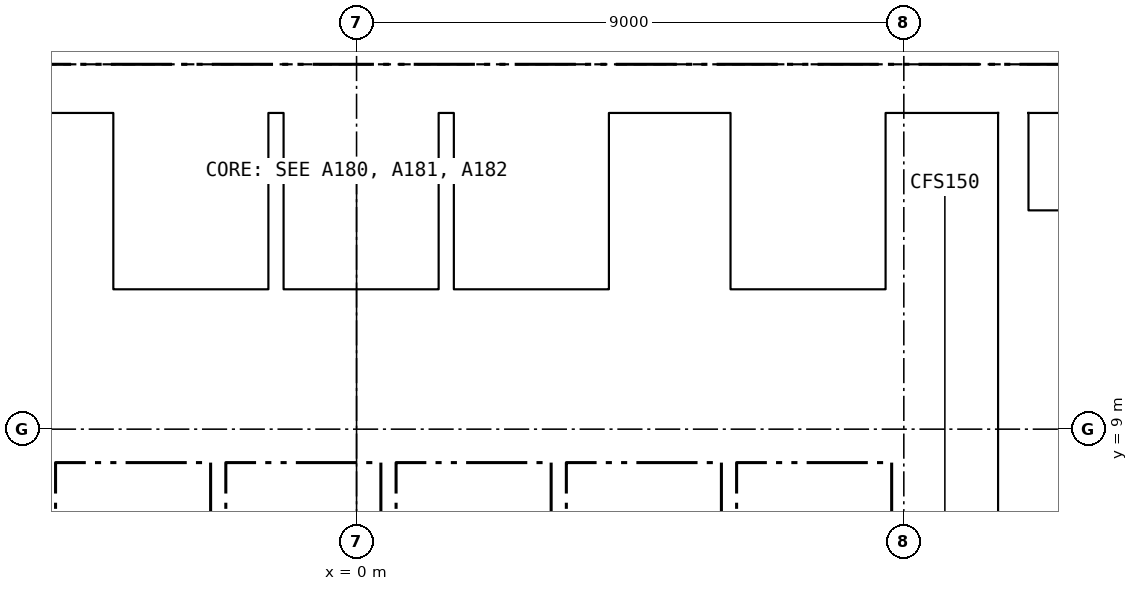
"""IFC4 building model, lengths in metres.
Left out: names, types, materials, properties, quantities, classifications, styles, units other than length and angle.
Written with IfcOpenShell. Run it as: python <this file> out.ifc"""

import sys

from ifc_helpers import new_model, si_unit, direction, frame, frame_2d, origin, place, context, subcontext, project, spatial, rectangle, extrude, element, fill, save


model = new_model("IFC4")
c1 = context("Model", 3, precision=1e-05, world=origin(), true_north=direction((0.0, 1.0)))
c2 = subcontext(c1, "Body", "Model", "MODEL_VIEW")
j1 = project(units=[si_unit("LENGTHUNIT", "METRE"), si_unit("PLANEANGLEUNIT", "RADIAN")], contexts=[c1])
p1 = place(None, origin())
s1 = spatial("IfcSite", under=j1, at=p1, CompositionType="ELEMENT")
p2 = place(p1, origin())
s2 = spatial("IfcBuilding", under=s1, at=p2, CompositionType="ELEMENT")
p3 = place(p2, frame((0.0, 0.0, 148.05)))
s3 = spatial("IfcBuildingStorey", under=s2, at=p3, CompositionType="ELEMENT", Elevation=148.05)
p4 = place(p3, frame((-15.0, 14.6, -0.15), z_axis=(0.0, 0.0, 1.0), x_axis=(1.0, 0.0, 0.0)))
e1 = element("IfcWall", 1, at=p4, inside=s3, PredefinedType="SOLIDWALL", context=c2, shape_type="SweptSolid", body=[
    extrude(rectangle(XDim=30.0, YDim=0.8, at=frame_2d((15.0, 0.0))), origin(), (0.0, 0.0, 1.0), 3.65),
])
p5 = place(p4, frame((9.25, 0.0, 0.15)))
e2 = element("IfcOpeningElement", 2, at=p5, cuts=e1, PredefinedType="OPENING", context=c2, shape_type="SweptSolid", body=[
    extrude(rectangle(XDim=1.5, YDim=2.1, at=frame_2d((0.75, 1.05))), frame((0.0, 0.41, 0.0), z_axis=(0.0, -1.0, 0.0), x_axis=(1.0, 0.0, 0.0)), (0.0, 0.0, 1.0), 0.82),
])
p6 = place(p4, frame((19.4, 0.0, 0.15)))
e3 = element("IfcOpeningElement", 3, at=p6, cuts=e1, PredefinedType="OPENING", context=c2, shape_type="SweptSolid", body=[
    extrude(rectangle(XDim=1.5, YDim=2.1, at=frame_2d((0.75, 1.05))), frame((0.0, 0.41, 0.0), z_axis=(0.0, -1.0, 0.0), x_axis=(1.0, 0.0, 0.0)), (0.0, 0.0, 1.0), 0.82),
])
p7 = place(p4, frame((1.5, 0.0, 0.15)))
e4 = element("IfcOpeningElement", 4, at=p7, cuts=e1, PredefinedType="OPENING", context=c2, shape_type="SweptSolid", body=[
    extrude(rectangle(XDim=1.2, YDim=2.1, at=frame_2d((0.6, 1.05))), frame((0.0, 0.41, 0.0), z_axis=(0.0, -1.0, 0.0), x_axis=(1.0, 0.0, 0.0)), (0.0, 0.0, 1.0), 0.82),
])
p8 = place(p4, frame((27.3, 0.0, 0.15)))
e5 = element("IfcOpeningElement", 5, at=p8, cuts=e1, PredefinedType="OPENING", context=c2, shape_type="SweptSolid", body=[
    extrude(rectangle(XDim=1.2, YDim=2.1, at=frame_2d((0.6, 1.05))), frame((0.0, 0.41, 0.0), z_axis=(0.0, -1.0, 0.0), x_axis=(1.0, 0.0, 0.0)), (0.0, 0.0, 1.0), 0.82),
])
p9 = place(p3, frame((10.8, 0.8, -0.15), z_axis=(0.0, 0.0, 1.0), x_axis=(0.0, 1.0, 0.0)))
e6 = element("IfcWall", 6, at=p9, inside=s3, PredefinedType="SOLIDWALL", context=c2, shape_type="SweptSolid", body=[
    extrude(rectangle(XDim=13.4, YDim=0.5, at=frame_2d((6.7, 0.0))), origin(), (0.0, 0.0, 1.0), 3.65),
])
p10 = place(p3, frame((-10.55, 8.55, 0.0), z_axis=(0.0, 0.0, 1.0), x_axis=(1.0, 0.0, 0.0)))
e7 = element("IfcWall", 7, at=p10, inside=s3, PredefinedType="PARTITIONING", context=c2, shape_type="SweptSolid", body=[
    extrude(rectangle(XDim=21.1, YDim=0.2, at=frame_2d((10.55, 0.0))), origin(), (0.0, 0.0, 1.0), 3.5),
])
p11 = place(p10, frame((0.675, 0.0, 0.0)))
e8 = element("IfcOpeningElement", 8, at=p11, cuts=e7, PredefinedType="OPENING", context=c2, shape_type="SweptSolid", body=[
    extrude(rectangle(XDim=1.2, YDim=2.1, at=frame_2d((0.6, 1.05))), frame((0.0, 0.11, 0.0), z_axis=(0.0, -1.0, 0.0), x_axis=(1.0, 0.0, 0.0)), (0.0, 0.0, 1.0), 0.22),
])
p12 = place(p10, frame((3.475, 0.0, 0.0)))
e9 = element("IfcOpeningElement", 9, at=p12, cuts=e7, PredefinedType="OPENING", context=c2, shape_type="SweptSolid", body=[
    extrude(rectangle(XDim=1.2, YDim=2.1, at=frame_2d((0.6, 1.05))), frame((0.0, 0.11, 0.0), z_axis=(0.0, -1.0, 0.0), x_axis=(1.0, 0.0, 0.0)), (0.0, 0.0, 1.0), 0.22),
])
p13 = place(p10, frame((6.275, 0.0, 0.0)))
e10 = element("IfcOpeningElement", 10, at=p13, cuts=e7, PredefinedType="OPENING", context=c2, shape_type="SweptSolid", body=[
    extrude(rectangle(XDim=1.2, YDim=2.1, at=frame_2d((0.6, 1.05))), frame((0.0, 0.11, 0.0), z_axis=(0.0, -1.0, 0.0), x_axis=(1.0, 0.0, 0.0)), (0.0, 0.0, 1.0), 0.22),
])
p14 = place(p10, frame((9.075, 0.0, 0.0)))
e11 = element("IfcOpeningElement", 11, at=p14, cuts=e7, PredefinedType="OPENING", context=c2, shape_type="SweptSolid", body=[
    extrude(rectangle(XDim=1.2, YDim=2.1, at=frame_2d((0.6, 1.05))), frame((0.0, 0.11, 0.0), z_axis=(0.0, -1.0, 0.0), x_axis=(1.0, 0.0, 0.0)), (0.0, 0.0, 1.0), 0.22),
])
p15 = place(p10, frame((11.875, 0.0, 0.0)))
e12 = element("IfcOpeningElement", 12, at=p15, cuts=e7, PredefinedType="OPENING", context=c2, shape_type="SweptSolid", body=[
    extrude(rectangle(XDim=1.2, YDim=2.1, at=frame_2d((0.6, 1.05))), frame((0.0, 0.11, 0.0), z_axis=(0.0, -1.0, 0.0), x_axis=(1.0, 0.0, 0.0)), (0.0, 0.0, 1.0), 0.22),
])
p16 = place(p10, frame((14.675, 0.0, 0.0)))
e13 = element("IfcOpeningElement", 13, at=p16, cuts=e7, PredefinedType="OPENING", context=c2, shape_type="SweptSolid", body=[
    extrude(rectangle(XDim=1.2, YDim=2.1, at=frame_2d((0.6, 1.05))), frame((0.0, 0.11, 0.0), z_axis=(0.0, -1.0, 0.0), x_axis=(1.0, 0.0, 0.0)), (0.0, 0.0, 1.0), 0.22),
])
p17 = place(p10, frame((17.475, 0.0, 0.0)))
e14 = element("IfcOpeningElement", 14, at=p17, cuts=e7, PredefinedType="OPENING", context=c2, shape_type="SweptSolid", body=[
    extrude(rectangle(XDim=1.2, YDim=2.1, at=frame_2d((0.6, 1.05))), frame((0.0, 0.11, 0.0), z_axis=(0.0, -1.0, 0.0), x_axis=(1.0, 0.0, 0.0)), (0.0, 0.0, 1.0), 0.22),
])
p18 = place(p10, frame((19.9, 0.0, 0.0)))
e15 = element("IfcOpeningElement", 15, at=p18, cuts=e7, PredefinedType="OPENING", context=c2, shape_type="SweptSolid", body=[
    extrude(rectangle(XDim=0.9, YDim=2.1, at=frame_2d((0.45, 1.05))), frame((0.0, 0.11, 0.0), z_axis=(0.0, -1.0, 0.0), x_axis=(1.0, 0.0, 0.0)), (0.0, 0.0, 1.0), 0.22),
])
p19 = place(p3, frame((-4.25, 11.2, 0.0), z_axis=(0.0, 0.0, 1.0), x_axis=(1.0, 0.0, 0.0)))
e16 = element("IfcWall", 16, at=p19, inside=s3, PredefinedType="PARTITIONING", context=c2, shape_type="SweptSolid", body=[
    extrude(rectangle(XDim=8.65, YDim=0.2, at=frame_2d((4.325, 0.0))), origin(), (0.0, 0.0, 1.0), 3.5),
])
p20 = place(p19, frame((0.825, 0.0, 0.0)))
e17 = element("IfcOpeningElement", 17, at=p20, cuts=e16, PredefinedType="OPENING", context=c2, shape_type="SweptSolid", body=[
    extrude(rectangle(XDim=1.4, YDim=2.1, at=frame_2d((0.7, 1.05))), frame((0.0, 0.11, 0.0), z_axis=(0.0, -1.0, 0.0), x_axis=(1.0, 0.0, 0.0)), (0.0, 0.0, 1.0), 0.22),
])
p21 = place(p19, frame((3.625, 0.0, 0.0)))
e18 = element("IfcOpeningElement", 18, at=p21, cuts=e16, PredefinedType="OPENING", context=c2, shape_type="SweptSolid", body=[
    extrude(rectangle(XDim=1.4, YDim=2.1, at=frame_2d((0.7, 1.05))), frame((0.0, 0.11, 0.0), z_axis=(0.0, -1.0, 0.0), x_axis=(1.0, 0.0, 0.0)), (0.0, 0.0, 1.0), 0.22),
])
p22 = place(p3, frame((5.9, 11.2, 0.0), z_axis=(0.0, 0.0, 1.0), x_axis=(1.0, 0.0, 0.0)))
e19 = element("IfcWall", 19, at=p22, inside=s3, PredefinedType="PARTITIONING", context=c2, shape_type="SweptSolid", body=[
    extrude(rectangle(XDim=4.65, YDim=0.2, at=frame_2d((2.325, 0.0))), origin(), (0.0, 0.0, 1.0), 3.5),
])
p23 = place(p22, frame((3.4, 0.0, 0.0)))
e20 = element("IfcOpeningElement", 20, at=p23, cuts=e19, PredefinedType="OPENING", context=c2, shape_type="SweptSolid", body=[
    extrude(rectangle(XDim=0.9, YDim=2.1, at=frame_2d((0.45, 1.05))), frame((0.0, 0.11, 0.0), z_axis=(0.0, -1.0, 0.0), x_axis=(1.0, 0.0, 0.0)), (0.0, 0.0, 1.0), 0.22),
])
p24 = place(p3, frame((-4.125, 8.65, 0.0), z_axis=(0.0, 0.0, 1.0), x_axis=(0.0, 1.0, 0.0)))
e21 = element("IfcWall", 21, at=p24, inside=s3, PredefinedType="PARTITIONING", context=c2, shape_type="SweptSolid", body=[
    extrude(rectangle(XDim=2.45, YDim=0.25, at=frame_2d((1.225, 0.0))), origin(), (0.0, 0.0, 1.0), 3.5),
])
p25 = place(p24, frame((0.625, 0.0, 0.0)))
e22 = element("IfcOpeningElement", 22, at=p25, cuts=e21, PredefinedType="OPENING", context=c2, shape_type="SweptSolid", body=[
    extrude(rectangle(XDim=1.2, YDim=2.1, at=frame_2d((0.6, 1.05))), frame((0.0, 0.135, 0.0), z_axis=(0.0, -1.0, 0.0), x_axis=(1.0, 0.0, 0.0)), (0.0, 0.0, 1.0), 0.27),
])
for number, where, z_axis, x_axis in (
    (23, (-5.075, 6.15, 0.0), (0.0, 0.0, 1.0), (0.0, 1.0, 0.0)),
    (24, (-2.275, 6.15, 0.0), (0.0, 0.0, 1.0), (0.0, 1.0, 0.0)),
    (25, (0.525, 6.15, 0.0), (0.0, 0.0, 1.0), (0.0, 1.0, 0.0)),
    (26, (3.325, 6.15, 0.0), (0.0, 0.0, 1.0), (0.0, 1.0, 0.0)),
    (27, (6.125, 6.15, 0.0), (0.0, 0.0, 1.0), (0.0, 1.0, 0.0)),
    (28, (8.925, 6.15, 0.0), (0.0, 0.0, 1.0), (0.0, 1.0, 0.0)),
):
    element("IfcWall", number, at=place(p3, frame(where, z_axis=z_axis, x_axis=x_axis)), inside=s3, PredefinedType="PARTITIONING", context=c2, shape_type="SweptSolid", body=[
        extrude(rectangle(XDim=2.3, YDim=0.25, at=frame_2d((1.15, 0.0))), origin(), (0.0, 0.0, 1.0), 3.5),
    ])
for number, where, z_axis, x_axis in (
    (29, (-4.125, 11.3, 0.0), (0.0, 0.0, 1.0), (0.0, 1.0, 0.0)),
    (30, (-1.325, 11.3, 0.0), (0.0, 0.0, 1.0), (0.0, 1.0, 0.0)),
    (31, (1.475, 11.3, 0.0), (0.0, 0.0, 1.0), (0.0, 1.0, 0.0)),
    (32, (4.275, 11.3, 0.0), (0.0, 0.0, 1.0), (0.0, 1.0, 0.0)),
    (33, (6.025, 11.3, 0.0), (0.0, 0.0, 1.0), (0.0, 1.0, 0.0)),
    (34, (8.825, 11.3, 0.0), (0.0, 0.0, 1.0), (0.0, 1.0, 0.0)),
):
    element("IfcWall", number, at=place(p3, frame(where, z_axis=z_axis, x_axis=x_axis)), inside=s3, PredefinedType="PARTITIONING", context=c2, shape_type="SweptSolid", body=[
        extrude(rectangle(XDim=2.9, YDim=0.25, at=frame_2d((1.45, 0.0))), origin(), (0.0, 0.0, 1.0), 3.5),
    ])
p26 = place(p25, origin())
e35 = element("IfcDoor", 35, at=p26, inside=s3, OperationType="SINGLE_SWING_LEFT", PredefinedType="DOOR", context=c2, shape_type="SweptSolid", body=[
    extrude(rectangle(XDim=1.2, YDim=2.1, at=frame_2d((0.6, 1.05))), frame((0.0, 0.025, 0.0), z_axis=(0.0, -1.0, 0.0), x_axis=(1.0, 0.0, 0.0)), (0.0, 0.0, 1.0), 0.05),
])
fill(e22, e35)
p27 = place(p13, origin())
e36 = element("IfcDoor", 36, at=p27, inside=s3, OperationType="DOUBLE_DOOR_SLIDING", PredefinedType="DOOR", context=c2, shape_type="SweptSolid", body=[
    extrude(rectangle(XDim=1.2, YDim=2.1, at=frame_2d((0.6, 1.05))), frame((0.0, 0.025, 0.0), z_axis=(0.0, -1.0, 0.0), x_axis=(1.0, 0.0, 0.0)), (0.0, 0.0, 1.0), 0.05),
])
fill(e10, e36)
p28 = place(p14, origin())
e37 = element("IfcDoor", 37, at=p28, inside=s3, OperationType="DOUBLE_DOOR_SLIDING", PredefinedType="DOOR", context=c2, shape_type="SweptSolid", body=[
    extrude(rectangle(XDim=1.2, YDim=2.1, at=frame_2d((0.6, 1.05))), frame((0.0, 0.025, 0.0), z_axis=(0.0, -1.0, 0.0), x_axis=(1.0, 0.0, 0.0)), (0.0, 0.0, 1.0), 0.05),
])
fill(e11, e37)
p29 = place(p15, origin())
e38 = element("IfcDoor", 38, at=p29, inside=s3, OperationType="DOUBLE_DOOR_SLIDING", PredefinedType="DOOR", context=c2, shape_type="SweptSolid", body=[
    extrude(rectangle(XDim=1.2, YDim=2.1, at=frame_2d((0.6, 1.05))), frame((0.0, 0.025, 0.0), z_axis=(0.0, -1.0, 0.0), x_axis=(1.0, 0.0, 0.0)), (0.0, 0.0, 1.0), 0.05),
])
fill(e12, e38)
p30 = place(p16, origin())
e39 = element("IfcDoor", 39, at=p30, inside=s3, OperationType="DOUBLE_DOOR_SLIDING", PredefinedType="DOOR", context=c2, shape_type="SweptSolid", body=[
    extrude(rectangle(XDim=1.2, YDim=2.1, at=frame_2d((0.6, 1.05))), frame((0.0, 0.025, 0.0), z_axis=(0.0, -1.0, 0.0), x_axis=(1.0, 0.0, 0.0)), (0.0, 0.0, 1.0), 0.05),
])
fill(e13, e39)
p31 = place(p17, origin())
e40 = element("IfcDoor", 40, at=p31, inside=s3, OperationType="DOUBLE_DOOR_SLIDING", PredefinedType="DOOR", context=c2, shape_type="SweptSolid", body=[
    extrude(rectangle(XDim=1.2, YDim=2.1, at=frame_2d((0.6, 1.05))), frame((0.0, 0.025, 0.0), z_axis=(0.0, -1.0, 0.0), x_axis=(1.0, 0.0, 0.0)), (0.0, 0.0, 1.0), 0.05),
])
fill(e14, e40)
p32 = place(p18, origin())
e41 = element("IfcDoor", 41, at=p32, inside=s3, OperationType="SINGLE_SWING_RIGHT", PredefinedType="DOOR", context=c2, shape_type="SweptSolid", body=[
    extrude(rectangle(XDim=0.9, YDim=2.1, at=frame_2d((0.45, 1.05))), frame((0.0, 0.025, 0.0), z_axis=(0.0, -1.0, 0.0), x_axis=(1.0, 0.0, 0.0)), (0.0, 0.0, 1.0), 0.05),
])
fill(e15, e41)
p33 = place(p20, origin())
e42 = element("IfcDoor", 42, at=p33, inside=s3, OperationType="DOUBLE_DOOR_SLIDING", PredefinedType="DOOR", context=c2, shape_type="SweptSolid", body=[
    extrude(rectangle(XDim=1.4, YDim=2.1, at=frame_2d((0.7, 1.05))), frame((0.0, 0.025, 0.0), z_axis=(0.0, -1.0, 0.0), x_axis=(1.0, 0.0, 0.0)), (0.0, 0.0, 1.0), 0.05),
])
fill(e17, e42)
p34 = place(p21, origin())
e43 = element("IfcDoor", 43, at=p34, inside=s3, OperationType="DOUBLE_DOOR_SLIDING", PredefinedType="DOOR", context=c2, shape_type="SweptSolid", body=[
    extrude(rectangle(XDim=1.4, YDim=2.1, at=frame_2d((0.7, 1.05))), frame((0.0, 0.025, 0.0), z_axis=(0.0, -1.0, 0.0), x_axis=(1.0, 0.0, 0.0)), (0.0, 0.0, 1.0), 0.05),
])
fill(e18, e43)
p35 = place(p23, origin())
e44 = element("IfcDoor", 44, at=p35, inside=s3, OperationType="SINGLE_SWING_LEFT", PredefinedType="DOOR", context=c2, shape_type="SweptSolid", body=[
    extrude(rectangle(XDim=0.9, YDim=2.1, at=frame_2d((0.45, 1.05))), frame((0.0, 0.025, 0.0), z_axis=(0.0, -1.0, 0.0), x_axis=(1.0, 0.0, 0.0)), (0.0, 0.0, 1.0), 0.05),
])
fill(e20, e44)
p36 = place(p5, origin())
e45 = element("IfcDoor", 45, at=p36, inside=s3, OperationType="DOUBLE_DOOR_SINGLE_SWING", PredefinedType="DOOR", context=c2, shape_type="SweptSolid", body=[
    extrude(rectangle(XDim=1.5, YDim=2.1, at=frame_2d((0.75, 1.05))), frame((0.0, 0.025, 0.0), z_axis=(0.0, -1.0, 0.0), x_axis=(1.0, 0.0, 0.0)), (0.0, 0.0, 1.0), 0.05),
])
fill(e2, e45)
p37 = place(p6, origin())
e46 = element("IfcDoor", 46, at=p37, inside=s3, OperationType="DOUBLE_DOOR_SINGLE_SWING", PredefinedType="DOOR", context=c2, shape_type="SweptSolid", body=[
    extrude(rectangle(XDim=1.5, YDim=2.1, at=frame_2d((0.75, 1.05))), frame((0.0, 0.025, 0.0), z_axis=(0.0, -1.0, 0.0), x_axis=(1.0, 0.0, 0.0)), (0.0, 0.0, 1.0), 0.05),
])
fill(e3, e46)
save(model, sys.argv[1])
